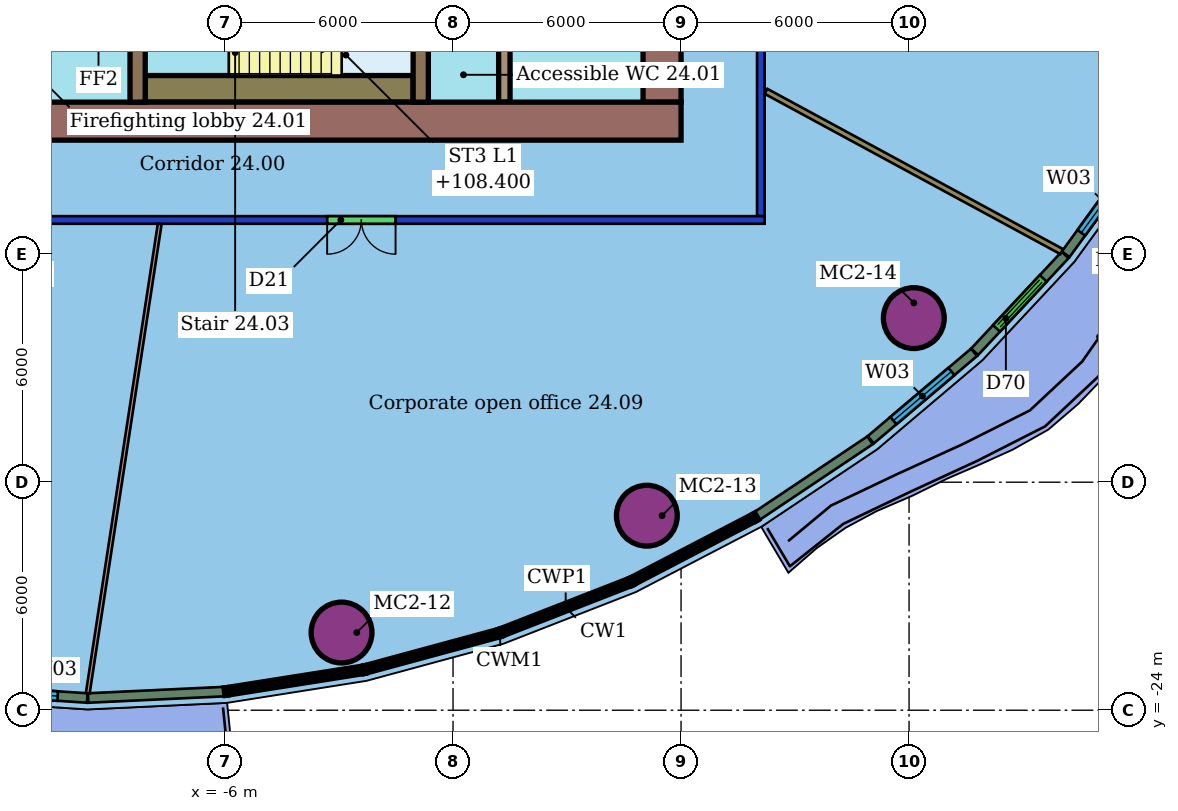
"""IFC4 building model, lengths in metres.
Left out: names, types, materials, properties, quantities, classifications, styles, units other than length and angle.
Written with IfcOpenShell. Run it as: python <this file> out.ifc"""

import sys

from ifc_helpers import new_model, si_unit, direction, frame, frame_2d, origin, origin_2d, place, context, subcontext, project, spatial, rectangle, hollow_circle, extrude, element, fill, save


model = new_model("IFC4")
c1 = context("Model", 3, precision=1e-05, world=origin(), true_north=direction((0.0, 1.0)))
c2 = subcontext(c1, "Body", "Model", "MODEL_VIEW")
j1 = project(units=[si_unit("LENGTHUNIT", "METRE"), si_unit("PLANEANGLEUNIT", "RADIAN")], contexts=[c1])
p1 = place(None, origin())
s1 = spatial("IfcSite", under=j1, at=p1, CompositionType="ELEMENT")
p2 = place(p1, origin())
s2 = spatial("IfcBuilding", under=s1, at=p2, CompositionType="ELEMENT")
p3 = place(p2, frame((0.0, 0.0, 106.6)))
s3 = spatial("IfcBuildingStorey", under=s2, at=p3, CompositionType="ELEMENT", Elevation=106.6)
for number, where, z_axis, x_axis in (
    (1, (-2.934, -21.956, 0.0), (0.0, 0.0, 1.0), (1.0, 0.0, 0.0)),
    (2, (5.1, -18.881, 0.0), (0.0, 0.0, 1.0), (1.0, 0.0, 0.0)),
    (3, (12.125, -13.683, 0.0), (0.0, 0.0, 1.0), (1.0, 0.0, 0.0)),
    (4, (17.679, -6.146, 0.0), (0.0, 0.0, 1.0), (1.0, 0.0, 0.0)),
):
    element("IfcColumn", number, at=place(p3, frame(where, z_axis=z_axis, x_axis=x_axis)), inside=s3, PredefinedType="COLUMN", context=c2, shape_type="SweptSolid", body=[
        extrude(hollow_circle(Radius=0.8, WallThickness=0.055, at=origin_2d()), origin(), (0.0, 0.0, 1.0), 3.45),
    ])
p4 = place(p3, frame((8.2, -11.1, 0.0), z_axis=(0.0, 0.0, 1.0), x_axis=(-1.0, 0.0, 0.0)))
e5 = element("IfcWall", 5, at=p4, inside=s3, PredefinedType="PARTITIONING", context=c2, shape_type="SweptSolid", body=[
    extrude(rectangle(XDim=28.4, YDim=0.2, at=frame_2d((14.2, 0.0))), origin(), (0.0, 0.0, 1.0), 3.0),
])
p5 = place(p4, frame((18.815, 0.0, 0.0)))
e6 = element("IfcOpeningElement", 6, at=p5, cuts=e5, PredefinedType="OPENING", context=c2, shape_type="SweptSolid", body=[
    extrude(rectangle(XDim=1.0, YDim=2.1, at=frame_2d((0.5, 1.05))), frame((0.0, 0.11, 0.0), z_axis=(0.0, -1.0, 0.0), x_axis=(1.0, 0.0, 0.0)), (0.0, 0.0, 1.0), 0.22),
])
p6 = place(p4, frame((9.712, 0.0, 0.0)))
e7 = element("IfcOpeningElement", 7, at=p6, cuts=e5, PredefinedType="OPENING", context=c2, shape_type="SweptSolid", body=[
    extrude(rectangle(XDim=1.8, YDim=2.1, at=frame_2d((0.9, 1.05))), frame((0.0, 0.11, 0.0), z_axis=(0.0, -1.0, 0.0), x_axis=(1.0, 0.0, 0.0)), (0.0, 0.0, 1.0), 0.22),
])
p7 = place(p3, frame((8.1, 11.0, 0.0), z_axis=(0.0, 0.0, 1.0), x_axis=(0.0, -1.0, 0.0)))
e8 = element("IfcWall", 8, at=p7, inside=s3, PredefinedType="PARTITIONING", context=c2, shape_type="SweptSolid", body=[
    extrude(rectangle(XDim=22.0, YDim=0.2, at=frame_2d((11.0, 0.0))), origin(), (0.0, 0.0, 1.0), 3.0),
])
p8 = place(p7, frame((14.236, 0.0, 0.0)))
e9 = element("IfcOpeningElement", 9, at=p8, cuts=e8, PredefinedType="OPENING", context=c2, shape_type="SweptSolid", body=[
    extrude(rectangle(XDim=1.5, YDim=2.1, at=frame_2d((0.75, 1.05))), frame((0.0, 0.11, 0.0), z_axis=(0.0, -1.0, 0.0), x_axis=(1.0, 0.0, 0.0)), (0.0, 0.0, 1.0), 0.22),
])
p9 = place(p7, frame((6.648, 0.0, 0.0)))
e10 = element("IfcOpeningElement", 10, at=p9, cuts=e8, PredefinedType="OPENING", context=c2, shape_type="SweptSolid", body=[
    extrude(rectangle(XDim=1.8, YDim=2.1, at=frame_2d((0.9, 1.05))), frame((0.0, 0.11, 0.0), z_axis=(0.0, -1.0, 0.0), x_axis=(1.0, 0.0, 0.0)), (0.0, 0.0, 1.0), 0.22),
])
p10 = place(p3, frame((-9.612, -23.554, 0.0), z_axis=(0.0, 0.0, 1.0), x_axis=(0.15159598099, 0.988442541855, 0.0)))
e11 = element("IfcWall", 11, at=p10, inside=s3, PredefinedType="PARTITIONING", context=c2, shape_type="SweptSolid", body=[
    extrude(rectangle(XDim=12.491, YDim=0.1, at=frame_2d((6.245, 0.0))), origin(), (0.0, 0.0, 1.0), 3.45),
])
p11 = place(p3, frame((16.018, -11.933, 0.0), z_axis=(0.0, 0.0, 1.0), x_axis=(-0.879177388761, 0.476494616015, 0.0)))
e12 = element("IfcWall", 12, at=p11, inside=s3, PredefinedType="PARTITIONING", context=c2, shape_type="SweptSolid", body=[
    extrude(rectangle(XDim=8.851, YDim=0.15, at=frame_2d((4.426, 0.0))), origin(), (0.0, 0.0, 1.0), 3.45),
])
p12 = place(p3, frame((-13.177, -23.444, 0.0), z_axis=(0.0, 0.0, 1.0), x_axis=(0.997840034655, -0.065690678477, 0.0)))
e13 = element("IfcWall", 13, at=p12, inside=s3, PredefinedType="SOLIDWALL", context=c2, shape_type="SweptSolid", body=[
    extrude(rectangle(XDim=3.56, YDim=0.25, at=frame_2d((1.78, 0.0))), origin(), (0.0, 0.0, 1.0), 3.05),
])
p13 = place(p12, frame((0.78, 0.0, 0.9)))
e14 = element("IfcOpeningElement", 14, at=p13, cuts=e13, PredefinedType="OPENING", context=c2, shape_type="SweptSolid", body=[
    extrude(rectangle(XDim=2.0, YDim=2.1, at=frame_2d((1.0, 1.05))), frame((0.0, 0.135, 0.0), z_axis=(0.0, -1.0, 0.0), x_axis=(1.0, 0.0, 0.0)), (0.0, 0.0, 1.0), 0.27),
])
for number, where, z_axis, x_axis in (
    (15, (-9.602, -23.678, 0.0), (0.0, 0.0, 1.0), (0.999, 0.047, 0.0)),
    (16, (8.002, -18.886, 0.0), (0.0, 0.0, 1.0), (0.831, 0.556, 0.0)),
):
    element("IfcWall", number, at=place(p3, frame(where, z_axis=z_axis, x_axis=x_axis)), inside=s3, PredefinedType="SOLIDWALL", context=c2, shape_type="SweptSolid", body=[
        extrude(rectangle(XDim=3.576, YDim=0.25, at=frame_2d((1.788, 0.0))), origin(), (0.0, 0.0, 1.0), 3.05),
    ])
p14 = place(p3, frame((10.992, -16.884, 0.0), z_axis=(0.0, 0.0, 1.0), x_axis=(0.763331662342, 0.646006790418, 0.0)))
e17 = element("IfcWall", 17, at=p14, inside=s3, PredefinedType="SOLIDWALL", context=c2, shape_type="SweptSolid", body=[
    extrude(rectangle(XDim=3.56, YDim=0.25, at=frame_2d((1.78, 0.0))), origin(), (0.0, 0.0, 1.0), 3.05),
])
p15 = place(p14, frame((0.78, 0.0, 0.9)))
e18 = element("IfcOpeningElement", 18, at=p15, cuts=e17, PredefinedType="OPENING", context=c2, shape_type="SweptSolid", body=[
    extrude(rectangle(XDim=2.0, YDim=2.1, at=frame_2d((1.0, 1.05))), frame((0.0, 0.135, 0.0), z_axis=(0.0, -1.0, 0.0), x_axis=(1.0, 0.0, 0.0)), (0.0, 0.0, 1.0), 0.27),
])
p16 = place(p3, frame((13.726, -14.568, 0.0), z_axis=(0.0, 0.0, 1.0), x_axis=(0.68271241641, 0.730687181002, 0.0)))
e19 = element("IfcWall", 19, at=p16, inside=s3, PredefinedType="SOLIDWALL", context=c2, shape_type="SweptSolid", body=[
    extrude(rectangle(XDim=3.486, YDim=0.25, at=frame_2d((1.743, 0.0))), origin(), (0.0, 0.0, 1.0), 3.05),
])
p17 = place(p16, frame((0.843, 0.0, 0.0)))
e20 = element("IfcOpeningElement", 20, at=p17, cuts=e19, PredefinedType="OPENING", context=c2, shape_type="SweptSolid", body=[
    extrude(rectangle(XDim=1.8, YDim=2.4, at=frame_2d((0.9, 1.2))), frame((0.0, 0.135, 0.0), z_axis=(0.0, -1.0, 0.0), x_axis=(1.0, 0.0, 0.0)), (0.0, 0.0, 1.0), 0.27),
])
p18 = place(p3, frame((16.121, -12.003, 0.0), z_axis=(0.0, 0.0, 1.0), x_axis=(0.588602739614, 0.808422423563, 0.0)))
e21 = element("IfcWall", 21, at=p18, inside=s3, PredefinedType="SOLIDWALL", context=c2, shape_type="SweptSolid", body=[
    extrude(rectangle(XDim=3.401, YDim=0.25, at=frame_2d((1.7, 0.0))), origin(), (0.0, 0.0, 1.0), 3.05),
])
p19 = place(p18, frame((0.7, 0.0, 0.9)))
e22 = element("IfcOpeningElement", 22, at=p19, cuts=e21, PredefinedType="OPENING", context=c2, shape_type="SweptSolid", body=[
    extrude(rectangle(XDim=2.0, YDim=2.1, at=frame_2d((1.0, 1.05))), frame((0.0, 0.135, 0.0), z_axis=(0.0, -1.0, 0.0), x_axis=(1.0, 0.0, 0.0)), (0.0, 0.0, 1.0), 0.27),
])
p20 = place(p3, frame((-18.0, -8.5, 0.0), z_axis=(0.0, 0.0, 1.0), x_axis=(1.0, 0.0, 0.0)))
e23 = element("IfcWall", 23, at=p20, inside=s3, PredefinedType="SHEAR", context=c2, shape_type="SweptSolid", body=[
    extrude(rectangle(XDim=24.0, YDim=1.0, at=frame_2d((12.0, 0.0))), origin(), (0.0, 0.0, 1.0), 3.3),
])
p21 = place(p20, frame((6.0, 0.0, 0.0)))
e24 = element("IfcOpeningElement", 24, at=p21, cuts=e23, PredefinedType="OPENING", context=c2, shape_type="SweptSolid", body=[
    extrude(rectangle(XDim=1.2, YDim=2.1, at=frame_2d((0.6, 1.05))), frame((0.0, 0.51, 0.0), z_axis=(0.0, -1.0, 0.0), x_axis=(1.0, 0.0, 0.0)), (0.0, 0.0, 1.0), 1.02),
])
p22 = place(p3, frame((5.5, -8.0, 0.0), z_axis=(0.0, 0.0, 1.0), x_axis=(0.0, 1.0, 0.0)))
e25 = element("IfcWall", 25, at=p22, inside=s3, PredefinedType="SHEAR", context=c2, shape_type="SweptSolid", body=[
    extrude(rectangle(XDim=16.0, YDim=1.0, at=frame_2d((8.0, 0.0))), origin(), (0.0, 0.0, 1.0), 3.3),
])
p23 = place(p22, frame((2.9, 0.0, 0.0)))
e26 = element("IfcOpeningElement", 26, at=p23, cuts=e25, PredefinedType="OPENING", context=c2, shape_type="SweptSolid", body=[
    extrude(rectangle(XDim=1.2, YDim=2.1, at=frame_2d((0.6, 1.05))), frame((0.0, 0.51, 0.0), z_axis=(0.0, -1.0, 0.0), x_axis=(1.0, 0.0, 0.0)), (0.0, 0.0, 1.0), 1.02),
])
p24 = place(p22, frame((11.9, 0.0, 0.0)))
e27 = element("IfcOpeningElement", 27, at=p24, cuts=e25, PredefinedType="OPENING", context=c2, shape_type="SweptSolid", body=[
    extrude(rectangle(XDim=1.2, YDim=2.1, at=frame_2d((0.6, 1.05))), frame((0.0, 0.51, 0.0), z_axis=(0.0, -1.0, 0.0), x_axis=(1.0, 0.0, 0.0)), (0.0, 0.0, 1.0), 1.02),
])
p25 = place(p3, frame((1.35, -8.0, 0.0), z_axis=(0.0, 0.0, 1.0), x_axis=(0.0, 1.0, 0.0)))
e28 = element("IfcWall", 28, at=p25, inside=s3, PredefinedType="SHEAR", context=c2, shape_type="SweptSolid", body=[
    extrude(rectangle(XDim=16.0, YDim=0.3, at=frame_2d((8.0, 0.0))), origin(), (0.0, 0.0, 1.0), 3.3),
])
p26 = place(p25, frame((1.91, 0.0, 0.0)))
e29 = element("IfcOpeningElement", 29, at=p26, cuts=e28, PredefinedType="OPENING", context=c2, shape_type="SweptSolid", body=[
    extrude(rectangle(XDim=1.0, YDim=2.1, at=frame_2d((0.5, 1.05))), frame((0.0, 0.16, 0.0), z_axis=(0.0, -1.0, 0.0), x_axis=(1.0, 0.0, 0.0)), (0.0, 0.0, 1.0), 0.32),
])
p27 = place(p25, frame((7.25, 0.0, 0.0)))
e30 = element("IfcOpeningElement", 30, at=p27, cuts=e28, PredefinedType="OPENING", context=c2, shape_type="SweptSolid", body=[
    extrude(rectangle(XDim=1.5, YDim=2.1, at=frame_2d((0.75, 1.05))), frame((0.0, 0.16, 0.0), z_axis=(0.0, -1.0, 0.0), x_axis=(1.0, 0.0, 0.0)), (0.0, 0.0, 1.0), 0.32),
])
p28 = place(p3, frame((-8.3, -3.88, 0.0), z_axis=(0.0, 0.0, 1.0), x_axis=(0.0, -1.0, 0.0)))
e31 = element("IfcWall", 31, at=p28, inside=s3, PredefinedType="SHEAR", context=c2, shape_type="SweptSolid", body=[
    extrude(rectangle(XDim=4.12, YDim=0.4, at=frame_2d((2.06, 0.0))), origin(), (0.0, 0.0, 1.0), 3.3),
])
p29 = place(p28, frame((1.11, 0.0, 0.0)))
e32 = element("IfcOpeningElement", 32, at=p29, cuts=e31, PredefinedType="OPENING", context=c2, shape_type="SweptSolid", body=[
    extrude(rectangle(XDim=1.2, YDim=2.1, at=frame_2d((0.6, 1.05))), frame((0.0, 0.21, 0.0), z_axis=(0.0, -1.0, 0.0), x_axis=(1.0, 0.0, 0.0)), (0.0, 0.0, 1.0), 0.42),
])
p30 = place(p3, frame((-0.85, -3.88, 0.0), z_axis=(0.0, 0.0, 1.0), x_axis=(0.0, -1.0, 0.0)))
e33 = element("IfcWall", 33, at=p30, inside=s3, PredefinedType="SHEAR", context=c2, shape_type="SweptSolid", body=[
    extrude(rectangle(XDim=4.12, YDim=0.4, at=frame_2d((2.06, 0.0))), origin(), (0.0, 0.0, 1.0), 3.3),
])
p31 = place(p3, frame((-8.1, -7.65, 0.0), z_axis=(0.0, 0.0, 1.0), x_axis=(1.0, 0.0, 0.0)))
e34 = element("IfcWall", 34, at=p31, inside=s3, PredefinedType="SHEAR", context=c2, shape_type="SweptSolid", body=[
    extrude(rectangle(XDim=7.05, YDim=0.7, at=frame_2d((3.525, 0.0))), origin(), (0.0, 0.0, 1.0), 3.3),
])
p32 = place(p6, origin())
e35 = element("IfcDoor", 35, at=p32, inside=s3, OperationType="DOUBLE_DOOR_SINGLE_SWING", PredefinedType="DOOR", context=c2, shape_type="SweptSolid", body=[
    extrude(rectangle(XDim=1.8, YDim=2.1, at=frame_2d((0.9, 1.05))), frame((0.0, 0.025, 0.0), z_axis=(0.0, -1.0, 0.0), x_axis=(1.0, 0.0, 0.0)), (0.0, 0.0, 1.0), 0.05),
])
fill(e7, e35)
p33 = place(p13, origin())
e36 = element("IfcWindow", 36, at=p33, inside=s3, PartitioningType="SINGLE_PANEL", PredefinedType="WINDOW", context=c2, shape_type="SweptSolid", body=[
    extrude(rectangle(XDim=2.0, YDim=2.1, at=frame_2d((1.0, 1.05))), frame((0.0, 0.03, 0.0), z_axis=(0.0, -1.0, 0.0), x_axis=(1.0, 0.0, 0.0)), (0.0, 0.0, 1.0), 0.06),
])
fill(e14, e36)
p34 = place(p15, origin())
e37 = element("IfcWindow", 37, at=p34, inside=s3, PartitioningType="SINGLE_PANEL", PredefinedType="WINDOW", context=c2, shape_type="SweptSolid", body=[
    extrude(rectangle(XDim=2.0, YDim=2.1, at=frame_2d((1.0, 1.05))), frame((0.0, 0.03, 0.0), z_axis=(0.0, -1.0, 0.0), x_axis=(1.0, 0.0, 0.0)), (0.0, 0.0, 1.0), 0.06),
])
fill(e18, e37)
p35 = place(p17, origin())
e38 = element("IfcDoor", 38, at=p35, inside=s3, OperationType="DOUBLE_DOOR_SLIDING", PredefinedType="DOOR", context=c2, shape_type="SweptSolid", body=[
    extrude(rectangle(XDim=1.8, YDim=2.4, at=frame_2d((0.9, 1.2))), frame((0.0, 0.025, 0.0), z_axis=(0.0, -1.0, 0.0), x_axis=(1.0, 0.0, 0.0)), (0.0, 0.0, 1.0), 0.05),
])
fill(e20, e38)
p36 = place(p19, origin())
e39 = element("IfcWindow", 39, at=p36, inside=s3, PartitioningType="SINGLE_PANEL", PredefinedType="WINDOW", context=c2, shape_type="SweptSolid", body=[
    extrude(rectangle(XDim=2.0, YDim=2.1, at=frame_2d((1.0, 1.05))), frame((0.0, 0.03, 0.0), z_axis=(0.0, -1.0, 0.0), x_axis=(1.0, 0.0, 0.0)), (0.0, 0.0, 1.0), 0.06),
])
fill(e22, e39)
save(model, sys.argv[1])
